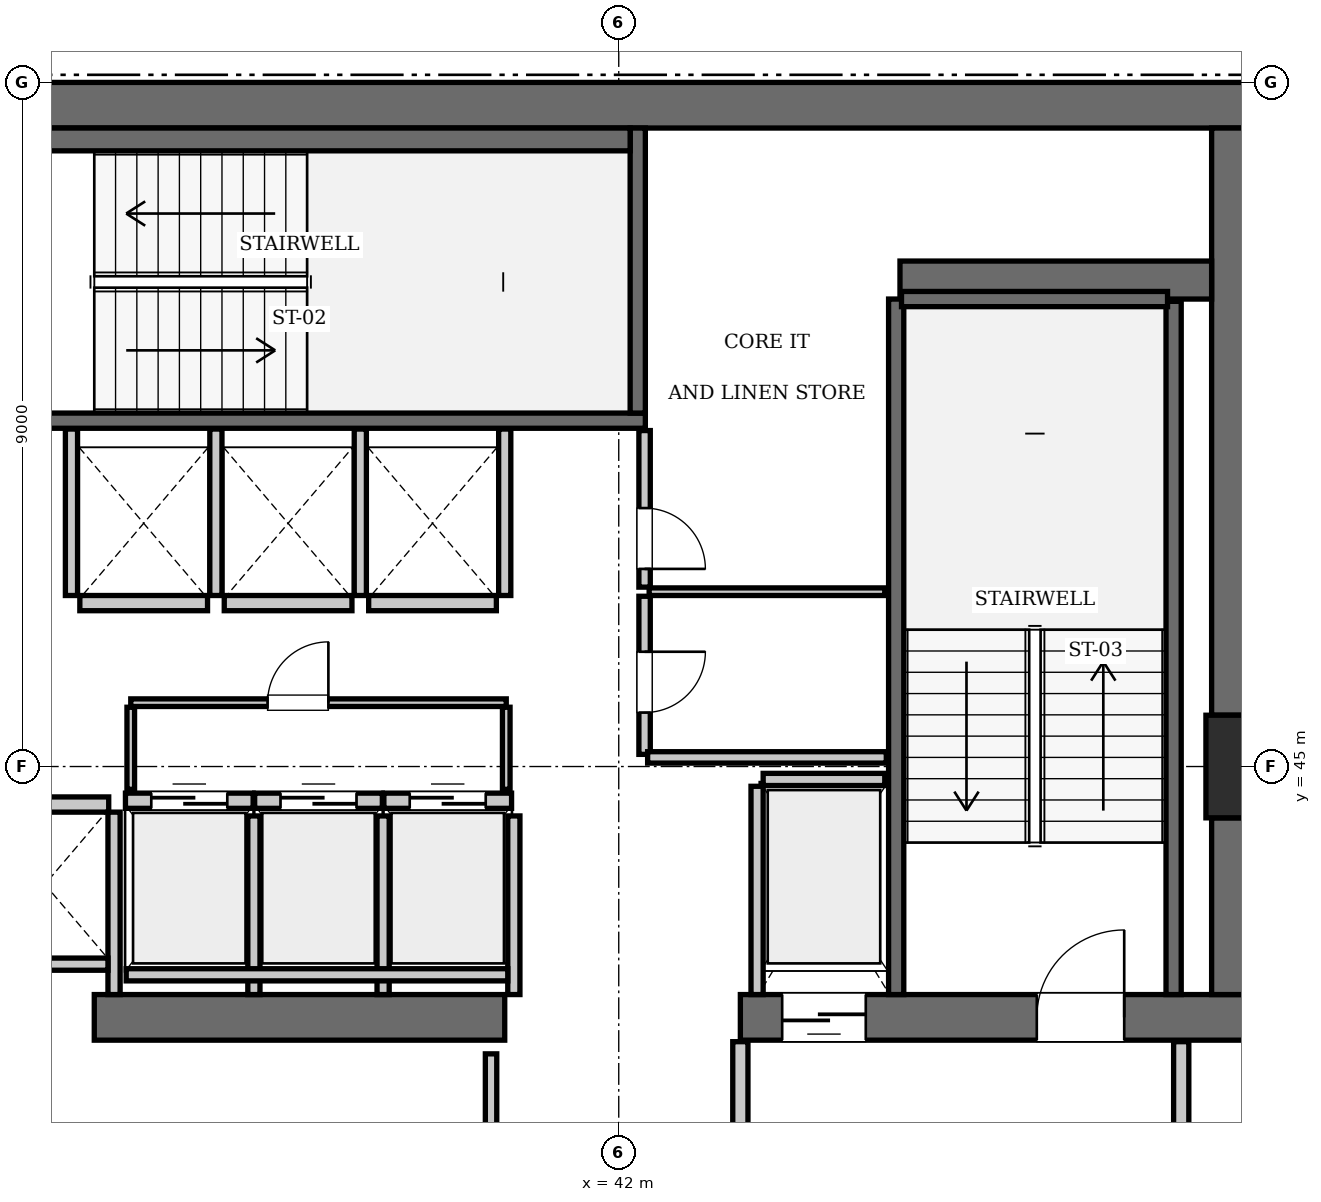
"""IFC4 building model, lengths in metres.
Left out: names, types, materials, properties, quantities, classifications, styles, units other than length and angle.
Written with IfcOpenShell. Run it as: python <this file> out.ifc"""

import sys

from ifc_helpers import new_model, si_unit, direction, frame, frame_2d, origin, origin_2d, place, context, subcontext, project, spatial, rectangle, extrude, element, fill, save


model = new_model("IFC4")
c1 = context("Model", 3, precision=1e-05, world=origin(), true_north=direction((0.0, 1.0)))
c2 = subcontext(c1, "Body", "Model", "MODEL_VIEW")
j1 = project(units=[si_unit("LENGTHUNIT", "METRE"), si_unit("PLANEANGLEUNIT", "RADIAN")], contexts=[c1])
p1 = place(None, origin())
s1 = spatial("IfcSite", under=j1, at=p1, CompositionType="ELEMENT")
p2 = place(p1, origin())
s2 = spatial("IfcBuilding", under=s1, at=p2, CompositionType="ELEMENT")
p3 = place(p2, frame((0.0, 0.0, 341.25)))
s3 = spatial("IfcBuildingStorey", under=s2, at=p3, CompositionType="ELEMENT", Elevation=341.25)
p4 = place(p3, frame((50.4, 45.0, 0.0), z_axis=(0.0, 0.0, 1.0), x_axis=(1.0, 0.0, 0.0)))
e1 = element("IfcColumn", 1, at=p4, inside=s3, PredefinedType="COLUMN", context=c2, shape_type="SweptSolid", body=[
    extrude(rectangle(XDim=1.35, YDim=1.35, at=origin_2d()), origin(), (0.0, 0.0, 1.0), 3.85),
])
p5 = place(p3, frame((25.2, 53.7, 0.0), z_axis=(0.0, 0.0, 1.0), x_axis=(1.0, 0.0, 0.0)))
e2 = element("IfcWall", 2, at=p5, inside=s3, PredefinedType="SHEAR", context=c2, shape_type="SweptSolid", body=[
    extrude(rectangle(XDim=25.2, YDim=0.6, at=frame_2d((12.6, 0.0))), origin(), (0.0, 0.0, 1.0), 3.85),
])
p6 = place(p3, frame((35.1, 41.7, 0.0), z_axis=(0.0, 0.0, 1.0), x_axis=(1.0, 0.0, 0.0)))
e3 = element("IfcWall", 3, at=p6, inside=s3, PredefinedType="SHEAR", context=c2, shape_type="SweptSolid", body=[
    extrude(rectangle(XDim=5.4, YDim=0.6, at=frame_2d((2.7, 0.0))), origin(), (0.0, 0.0, 1.0), 3.85),
])
p7 = place(p3, frame((43.6, 41.7, 0.0), z_axis=(0.0, 0.0, 1.0), x_axis=(1.0, 0.0, 0.0)))
e4 = element("IfcWall", 4, at=p7, inside=s3, PredefinedType="SHEAR", context=c2, shape_type="SweptSolid", body=[
    extrude(rectangle(XDim=6.8, YDim=0.6, at=frame_2d((3.4, 0.0))), origin(), (0.0, 0.0, 1.0), 3.85),
])
p8 = place(p7, frame((3.9, 0.0, 0.0)))
e5 = element("IfcOpeningElement", 5, at=p8, cuts=e4, PredefinedType="OPENING", context=c2, shape_type="SweptSolid", body=[
    extrude(rectangle(XDim=1.15, YDim=2.15, at=frame_2d((0.575, 1.075))), frame((0.0, 0.31, 0.0), z_axis=(0.0, -1.0, 0.0), x_axis=(1.0, 0.0, 0.0)), (0.0, 0.0, 1.0), 0.62),
])
p9 = place(p7, frame((0.55, 0.0, 0.0)))
e6 = element("IfcOpeningElement", 6, at=p9, cuts=e4, PredefinedType="OPENING", context=c2, shape_type="SweptSolid", body=[
    extrude(rectangle(XDim=1.1, YDim=2.2, at=frame_2d((0.55, 1.1))), frame((0.0, 0.31, 0.0), z_axis=(0.0, -1.0, 0.0), x_axis=(1.0, 0.0, 0.0)), (0.0, 0.0, 1.0), 0.62),
])
p10 = place(p3, frame((50.1, 42.0, 0.0), z_axis=(0.0, 0.0, 1.0), x_axis=(0.0, 1.0, 0.0)))
e7 = element("IfcWall", 7, at=p10, inside=s3, PredefinedType="SHEAR", context=c2, shape_type="SweptSolid", body=[
    extrude(rectangle(XDim=2.325, YDim=0.6, at=frame_2d((1.163, 0.0))), origin(), (0.0, 0.0, 1.0), 3.85),
])
p11 = place(p3, frame((50.1, 45.675, 0.0), z_axis=(0.0, 0.0, 1.0), x_axis=(0.0, 1.0, 0.0)))
e8 = element("IfcWall", 8, at=p11, inside=s3, PredefinedType="SHEAR", context=c2, shape_type="SweptSolid", body=[
    extrude(rectangle(XDim=7.725, YDim=0.6, at=frame_2d((3.862, 0.0))), origin(), (0.0, 0.0, 1.0), 3.85),
])
p12 = place(p3, frame((45.7, 51.4, 0.0), z_axis=(0.0, 0.0, 1.0), x_axis=(1.0, 0.0, 0.0)))
e9 = element("IfcWall", 9, at=p12, inside=s3, PredefinedType="SHEAR", context=c2, shape_type="SweptSolid", body=[
    extrude(rectangle(XDim=4.1, YDim=0.5, at=frame_2d((2.05, 0.0))), origin(), (0.0, 0.0, 1.0), 3.85),
])
p13 = place(p3, frame((33.25, 49.55, 0.0), z_axis=(0.0, 0.0, 1.0), x_axis=(1.0, 0.0, 0.0)))
e10 = element("IfcWall", 10, at=p13, inside=s3, PredefinedType="SOLIDWALL", context=c2, shape_type="SweptSolid", body=[
    extrude(rectangle(XDim=9.1, YDim=0.2, at=frame_2d((4.55, 0.0))), origin(), (0.0, 0.0, 1.0), 3.61),
])
p14 = place(p3, frame((42.25, 49.65, 0.0), z_axis=(0.0, 0.0, 1.0), x_axis=(0.0, 1.0, 0.0)))
e11 = element("IfcWall", 11, at=p14, inside=s3, PredefinedType="SOLIDWALL", context=c2, shape_type="SweptSolid", body=[
    extrude(rectangle(XDim=3.75, YDim=0.2, at=frame_2d((1.875, 0.0))), origin(), (0.0, 0.0, 1.0), 3.61),
])
p15 = place(p3, frame((33.45, 53.25, 0.0), z_axis=(0.0, 0.0, 1.0), x_axis=(1.0, 0.0, 0.0)))
e12 = element("IfcWall", 12, at=p15, inside=s3, PredefinedType="SOLIDWALL", context=c2, shape_type="SweptSolid", body=[
    extrude(rectangle(XDim=8.7, YDim=0.3, at=frame_2d((4.35, 0.0))), origin(), (0.0, 0.0, 1.0), 3.61),
])
p16 = place(p3, frame((45.65, 42.0, 0.0), z_axis=(0.0, 0.0, 1.0), x_axis=(0.0, 1.0, 0.0)))
e13 = element("IfcWall", 13, at=p16, inside=s3, PredefinedType="SOLIDWALL", context=c2, shape_type="SweptSolid", body=[
    extrude(rectangle(XDim=9.15, YDim=0.2, at=frame_2d((4.575, 0.0))), origin(), (0.0, 0.0, 1.0), 3.61),
])
p17 = place(p3, frame((49.3, 42.0, 0.0), z_axis=(0.0, 0.0, 1.0), x_axis=(0.0, 1.0, 0.0)))
e14 = element("IfcWall", 14, at=p17, inside=s3, PredefinedType="SOLIDWALL", context=c2, shape_type="SweptSolid", body=[
    extrude(rectangle(XDim=9.12, YDim=0.2, at=frame_2d((4.56, 0.0))), origin(), (0.0, 0.0, 1.0), 3.61),
])
p18 = place(p3, frame((45.72, 51.15, 0.0), z_axis=(0.0, 0.0, 1.0), x_axis=(1.0, 0.0, 0.0)))
e15 = element("IfcWall", 15, at=p18, inside=s3, PredefinedType="SOLIDWALL", context=c2, shape_type="SweptSolid", body=[
    extrude(rectangle(XDim=3.5, YDim=0.2, at=frame_2d((1.75, 0.0))), origin(), (0.0, 0.0, 1.0), 3.61),
])
p19 = place(p3, frame((35.51, 44.55, 0.0), z_axis=(0.0, 0.0, 1.0), x_axis=(1.0, 0.0, 0.0)))
e16 = element("IfcWall", 16, at=p19, inside=s3, PredefinedType="SOLIDWALL", context=c2, shape_type="SweptSolid", body=[
    extrude(rectangle(XDim=1.68, YDim=0.2, at=frame_2d((0.84, 0.0))), origin(), (0.0, 0.0, 1.0), 3.61),
])
p20 = place(p19, frame((0.34, 0.0, 0.0)))
e17 = element("IfcOpeningElement", 17, at=p20, cuts=e16, PredefinedType="OPENING", context=c2, shape_type="SweptSolid", body=[
    extrude(rectangle(XDim=1.0, YDim=2.15, at=frame_2d((0.5, 1.075))), frame((0.0, 0.11, 0.0), z_axis=(0.0, -1.0, 0.0), x_axis=(1.0, 0.0, 0.0)), (0.0, 0.0, 1.0), 0.22),
])
p21 = place(p3, frame((37.21, 44.55, 0.0), z_axis=(0.0, 0.0, 1.0), x_axis=(1.0, 0.0, 0.0)))
e18 = element("IfcWall", 18, at=p21, inside=s3, PredefinedType="SOLIDWALL", context=c2, shape_type="SweptSolid", body=[
    extrude(rectangle(XDim=1.68, YDim=0.2, at=frame_2d((0.84, 0.0))), origin(), (0.0, 0.0, 1.0), 3.61),
])
p22 = place(p21, frame((0.34, 0.0, 0.0)))
e19 = element("IfcOpeningElement", 19, at=p22, cuts=e18, PredefinedType="OPENING", context=c2, shape_type="SweptSolid", body=[
    extrude(rectangle(XDim=1.0, YDim=2.15, at=frame_2d((0.5, 1.075))), frame((0.0, 0.11, 0.0), z_axis=(0.0, -1.0, 0.0), x_axis=(1.0, 0.0, 0.0)), (0.0, 0.0, 1.0), 0.22),
])
p23 = place(p3, frame((38.91, 44.55, 0.0), z_axis=(0.0, 0.0, 1.0), x_axis=(1.0, 0.0, 0.0)))
e20 = element("IfcWall", 20, at=p23, inside=s3, PredefinedType="SOLIDWALL", context=c2, shape_type="SweptSolid", body=[
    extrude(rectangle(XDim=1.68, YDim=0.2, at=frame_2d((0.84, 0.0))), origin(), (0.0, 0.0, 1.0), 3.61),
])
p24 = place(p23, frame((0.34, 0.0, 0.0)))
e21 = element("IfcOpeningElement", 21, at=p24, cuts=e20, PredefinedType="OPENING", context=c2, shape_type="SweptSolid", body=[
    extrude(rectangle(XDim=1.0, YDim=2.15, at=frame_2d((0.5, 1.075))), frame((0.0, 0.11, 0.0), z_axis=(0.0, -1.0, 0.0), x_axis=(1.0, 0.0, 0.0)), (0.0, 0.0, 1.0), 0.22),
])
p25 = place(p3, frame((34.91, 47.15, 0.0), z_axis=(0.0, 0.0, 1.0), x_axis=(1.0, 0.0, 0.0)))
e22 = element("IfcWall", 22, at=p25, inside=s3, PredefinedType="SOLIDWALL", context=c2, shape_type="SweptSolid", body=[
    extrude(rectangle(XDim=1.68, YDim=0.2, at=frame_2d((0.84, 0.0))), origin(), (0.0, 0.0, 1.0), 3.61),
])
for number, where, z_axis, x_axis in (
    (23, (36.81, 47.15, 0.0), (0.0, 0.0, 1.0), (1.0, 0.0, 0.0)),
    (24, (38.71, 47.15, 0.0), (0.0, 0.0, 1.0), (1.0, 0.0, 0.0)),
    (25, (33.61, 44.5, 0.0), (0.0, 0.0, 1.0), (1.0, 0.0, 0.0)),
):
    element("IfcWall", number, at=place(p3, frame(where, z_axis=z_axis, x_axis=x_axis)), inside=s3, PredefinedType="SOLIDWALL", context=c2, shape_type="SweptSolid", body=[
        extrude(rectangle(XDim=1.68, YDim=0.2, at=frame_2d((0.84, 0.0))), origin(), (0.0, 0.0, 1.0), 3.61),
    ])
p26 = place(p3, frame((43.9, 44.83, 0.0), z_axis=(0.0, 0.0, 1.0), x_axis=(1.0, 0.0, 0.0)))
e26 = element("IfcWall", 26, at=p26, inside=s3, PredefinedType="SOLIDWALL", context=c2, shape_type="SweptSolid", body=[
    extrude(rectangle(XDim=1.6, YDim=0.16, at=frame_2d((0.8, 0.0))), origin(), (0.0, 0.0, 1.0), 3.61),
])
p27 = place(p3, frame((43.82, 42.0, 0.0), z_axis=(0.0, 0.0, 1.0), x_axis=(0.0, 1.0, 0.0)))
e27 = element("IfcWall", 27, at=p27, inside=s3, PredefinedType="SOLIDWALL", context=c2, shape_type="SweptSolid", body=[
    extrude(rectangle(XDim=2.74, YDim=0.16, at=frame_2d((1.37, 0.0))), origin(), (0.0, 0.0, 1.0), 3.61),
])
for number, where, z_axis, x_axis in (
    (28, (37.2, 42.0, 0.0), (0.0, 0.0, 1.0), (0.0, 1.0, 0.0)),
    (29, (38.9, 42.0, 0.0), (0.0, 0.0, 1.0), (0.0, 1.0, 0.0)),
    (30, (40.62, 42.0, 0.0), (0.0, 0.0, 1.0), (0.0, 1.0, 0.0)),
):
    element("IfcWall", number, at=place(p3, frame(where, z_axis=z_axis, x_axis=x_axis)), inside=s3, PredefinedType="SOLIDWALL", context=c2, shape_type="SweptSolid", body=[
        extrude(rectangle(XDim=2.35, YDim=0.16, at=frame_2d((1.175, 0.0))), origin(), (0.0, 0.0, 1.0), 3.61),
    ])
p28 = place(p3, frame((35.52, 42.26, 0.0), z_axis=(0.0, 0.0, 1.0), x_axis=(1.0, 0.0, 0.0)))
e31 = element("IfcWall", 31, at=p28, inside=s3, PredefinedType="SOLIDWALL", context=c2, shape_type="SweptSolid", body=[
    extrude(rectangle(XDim=5.02, YDim=0.16, at=frame_2d((2.51, 0.0))), origin(), (0.0, 0.0, 1.0), 3.61),
])
for number, where, z_axis, x_axis in (
    (32, (34.8, 47.25, 0.0), (0.0, 0.0, 1.0), (0.0, 1.0, 0.0)),
    (33, (36.7, 47.25, 0.0), (0.0, 0.0, 1.0), (0.0, 1.0, 0.0)),
    (34, (38.6, 47.25, 0.0), (0.0, 0.0, 1.0), (0.0, 1.0, 0.0)),
    (35, (40.5, 47.25, 0.0), (0.0, 0.0, 1.0), (0.0, 1.0, 0.0)),
):
    element("IfcWall", number, at=place(p3, frame(where, z_axis=z_axis, x_axis=x_axis)), inside=s3, PredefinedType="SOLIDWALL", context=c2, shape_type="SweptSolid", body=[
        extrude(rectangle(XDim=2.19, YDim=0.16, at=frame_2d((1.095, 0.0))), origin(), (0.0, 0.0, 1.0), 3.61),
    ])
p29 = place(p3, frame((35.36, 42.0, 0.0), z_axis=(0.0, 0.0, 1.0), x_axis=(0.0, 1.0, 0.0)))
e36 = element("IfcWall", 36, at=p29, inside=s3, PredefinedType="SOLIDWALL", context=c2, shape_type="SweptSolid", body=[
    extrude(rectangle(XDim=2.4, YDim=0.16, at=frame_2d((1.2, 0.0))), origin(), (0.0, 0.0, 1.0), 3.61),
])
p30 = place(p3, frame((33.62, 42.4, 0.0), z_axis=(0.0, 0.0, 1.0), x_axis=(1.0, 0.0, 0.0)))
e37 = element("IfcWall", 37, at=p30, inside=s3, PredefinedType="SOLIDWALL", context=c2, shape_type="SweptSolid", body=[
    extrude(rectangle(XDim=1.66, YDim=0.16, at=frame_2d((0.83, 0.0))), origin(), (0.0, 0.0, 1.0), 3.61),
])
for number, where, z_axis, x_axis in (
    (38, (43.6, 38.31, 0.0), (0.0, 0.0, 1.0), (0.0, 1.0, 0.0)),
    (39, (49.4, 38.31, 0.0), (0.0, 0.0, 1.0), (0.0, 1.0, 0.0)),
):
    element("IfcWall", number, at=place(p3, frame(where, z_axis=z_axis, x_axis=x_axis)), inside=s3, PredefinedType="PARTITIONING", context=c2, shape_type="SweptSolid", body=[
        extrude(rectangle(XDim=3.07, YDim=0.2, at=frame_2d((1.535, 0.0))), origin(), (0.0, 0.0, 1.0), 3.61),
    ])
p31 = place(p3, frame((35.58, 45.84, 0.0), z_axis=(0.0, 0.0, 1.0), x_axis=(1.0, 0.0, 0.0)))
e40 = element("IfcWall", 40, at=p31, inside=s3, PredefinedType="PARTITIONING", context=c2, shape_type="SweptSolid", body=[
    extrude(rectangle(XDim=4.94, YDim=0.1, at=frame_2d((2.47, 0.0))), origin(), (0.0, 0.0, 1.0), 3.61),
])
p32 = place(p31, frame((1.8, 0.0, 0.0)))
e41 = element("IfcOpeningElement", 41, at=p32, cuts=e40, PredefinedType="OPENING", context=c2, shape_type="SweptSolid", body=[
    extrude(rectangle(XDim=0.8, YDim=2.05, at=frame_2d((0.4, 1.025))), frame((0.0, 0.06, 0.0), z_axis=(0.0, -1.0, 0.0), x_axis=(1.0, 0.0, 0.0)), (0.0, 0.0, 1.0), 0.12),
])
for number, where, z_axis, x_axis in (
    (42, (35.58, 44.7, 0.0), (0.0, 0.0, 1.0), (0.0, 1.0, 0.0)),
    (43, (40.52, 44.7, 0.0), (0.0, 0.0, 1.0), (0.0, 1.0, 0.0)),
):
    element("IfcWall", number, at=place(p3, frame(where, z_axis=z_axis, x_axis=x_axis)), inside=s3, PredefinedType="PARTITIONING", context=c2, shape_type="SweptSolid", body=[
        extrude(rectangle(XDim=1.08, YDim=0.1, at=frame_2d((0.54, 0.0))), origin(), (0.0, 0.0, 1.0), 3.61),
    ])
p33 = place(p3, frame((42.34, 45.16, 0.0), z_axis=(0.0, 0.0, 1.0), x_axis=(0.0, 1.0, 0.0)))
e44 = element("IfcWall", 44, at=p33, inside=s3, PredefinedType="PARTITIONING", context=c2, shape_type="SweptSolid", body=[
    extrude(rectangle(XDim=2.08, YDim=0.15, at=frame_2d((1.04, 0.0))), origin(), (0.0, 0.0, 1.0), 3.61),
])
p34 = place(p33, frame((0.55, 0.0, 0.0)))
e45 = element("IfcOpeningElement", 45, at=p34, cuts=e44, PredefinedType="OPENING", context=c2, shape_type="SweptSolid", body=[
    extrude(rectangle(XDim=0.8, YDim=2.05, at=frame_2d((0.4, 1.025))), frame((0.0, 0.085, 0.0), z_axis=(0.0, -1.0, 0.0), x_axis=(1.0, 0.0, 0.0)), (0.0, 0.0, 1.0), 0.17),
])
p35 = place(p3, frame((42.34, 47.36, 0.0), z_axis=(0.0, 0.0, 1.0), x_axis=(0.0, 1.0, 0.0)))
e46 = element("IfcWall", 46, at=p35, inside=s3, PredefinedType="PARTITIONING", context=c2, shape_type="SweptSolid", body=[
    extrude(rectangle(XDim=2.06, YDim=0.15, at=frame_2d((1.03, 0.0))), origin(), (0.0, 0.0, 1.0), 3.61),
])
p36 = place(p35, frame((0.24, 0.0, 0.0)))
e47 = element("IfcOpeningElement", 47, at=p36, cuts=e46, PredefinedType="OPENING", context=c2, shape_type="SweptSolid", body=[
    extrude(rectangle(XDim=0.8, YDim=2.05, at=frame_2d((0.4, 1.025))), frame((0.0, 0.085, 0.0), z_axis=(0.0, -1.0, 0.0), x_axis=(1.0, 0.0, 0.0)), (0.0, 0.0, 1.0), 0.17),
])
p37 = place(p3, frame((42.4, 47.3, 0.0), z_axis=(0.0, 0.0, 1.0), x_axis=(1.0, 0.0, 0.0)))
e48 = element("IfcWall", 48, at=p37, inside=s3, PredefinedType="PARTITIONING", context=c2, shape_type="SweptSolid", body=[
    extrude(rectangle(XDim=3.1, YDim=0.1, at=frame_2d((1.55, 0.0))), origin(), (0.0, 0.0, 1.0), 3.61),
])
p38 = place(p3, frame((42.38, 45.12, 0.0), z_axis=(0.0, 0.0, 1.0), x_axis=(1.0, 0.0, 0.0)))
e49 = element("IfcWall", 49, at=p38, inside=s3, PredefinedType="PARTITIONING", context=c2, shape_type="SweptSolid", body=[
    extrude(rectangle(XDim=3.14, YDim=0.15, at=frame_2d((1.57, 0.0))), origin(), (0.0, 0.0, 1.0), 3.61),
])
p39 = place(p3, frame((40.32, 38.38, 0.0), z_axis=(0.0, 0.0, 1.0), x_axis=(0.0, 1.0, 0.0)))
e50 = element("IfcWall", 50, at=p39, inside=s3, PredefinedType="PARTITIONING", context=c2, shape_type="SweptSolid", body=[
    extrude(rectangle(XDim=2.84, YDim=0.15, at=frame_2d((1.42, 0.0))), origin(), (0.0, 0.0, 1.0), 3.61),
])
p40 = place(p8, origin())
e51 = element("IfcDoor", 51, at=p40, inside=s3, OperationType="SINGLE_SWING_RIGHT", PredefinedType="DOOR", context=c2, shape_type="SweptSolid", body=[
    extrude(rectangle(XDim=1.15, YDim=2.15, at=frame_2d((0.575, 1.075))), frame((0.0, 0.025, 0.0), z_axis=(0.0, -1.0, 0.0), x_axis=(1.0, 0.0, 0.0)), (0.0, 0.0, 1.0), 0.05),
])
fill(e5, e51)
p41 = place(p20, origin())
e52 = element("IfcDoor", 52, at=p41, inside=s3, OperationType="SLIDING_TO_LEFT", PredefinedType="DOOR", context=c2, shape_type="SweptSolid", body=[
    extrude(rectangle(XDim=1.0, YDim=2.15, at=frame_2d((0.5, 1.075))), frame((0.0, 0.025, 0.0), z_axis=(0.0, -1.0, 0.0), x_axis=(1.0, 0.0, 0.0)), (0.0, 0.0, 1.0), 0.05),
])
fill(e17, e52)
p42 = place(p22, origin())
e53 = element("IfcDoor", 53, at=p42, inside=s3, OperationType="SLIDING_TO_LEFT", PredefinedType="DOOR", context=c2, shape_type="SweptSolid", body=[
    extrude(rectangle(XDim=1.0, YDim=2.15, at=frame_2d((0.5, 1.075))), frame((0.0, 0.025, 0.0), z_axis=(0.0, -1.0, 0.0), x_axis=(1.0, 0.0, 0.0)), (0.0, 0.0, 1.0), 0.05),
])
fill(e19, e53)
p43 = place(p24, origin())
e54 = element("IfcDoor", 54, at=p43, inside=s3, OperationType="SLIDING_TO_LEFT", PredefinedType="DOOR", context=c2, shape_type="SweptSolid", body=[
    extrude(rectangle(XDim=1.0, YDim=2.15, at=frame_2d((0.5, 1.075))), frame((0.0, 0.025, 0.0), z_axis=(0.0, -1.0, 0.0), x_axis=(1.0, 0.0, 0.0)), (0.0, 0.0, 1.0), 0.05),
])
fill(e21, e54)
p44 = place(p9, frame((1.1, 0.0, 0.0), z_axis=(0.0, 0.0, 1.0), x_axis=(-1.0, 0.0, 0.0)))
e55 = element("IfcDoor", 55, at=p44, inside=s3, OperationType="SLIDING_TO_LEFT", PredefinedType="DOOR", context=c2, shape_type="SweptSolid", body=[
    extrude(rectangle(XDim=1.1, YDim=2.2, at=frame_2d((0.55, 1.1))), frame((0.0, 0.025, 0.0), z_axis=(0.0, -1.0, 0.0), x_axis=(1.0, 0.0, 0.0)), (0.0, 0.0, 1.0), 0.05),
])
fill(e6, e55)
p45 = place(p32, origin())
e56 = element("IfcDoor", 56, at=p45, inside=s3, OperationType="SINGLE_SWING_RIGHT", PredefinedType="DOOR", context=c2, shape_type="SweptSolid", body=[
    extrude(rectangle(XDim=0.8, YDim=2.05, at=frame_2d((0.4, 1.025))), frame((0.0, 0.025, 0.0), z_axis=(0.0, -1.0, 0.0), x_axis=(1.0, 0.0, 0.0)), (0.0, 0.0, 1.0), 0.05),
])
fill(e41, e56)
p46 = place(p34, frame((0.8, 0.0, 0.0), z_axis=(0.0, 0.0, 1.0), x_axis=(-1.0, 0.0, 0.0)))
e57 = element("IfcDoor", 57, at=p46, inside=s3, OperationType="SINGLE_SWING_LEFT", PredefinedType="DOOR", context=c2, shape_type="SweptSolid", body=[
    extrude(rectangle(XDim=0.8, YDim=2.05, at=frame_2d((0.4, 1.025))), frame((0.0, 0.025, 0.0), z_axis=(0.0, -1.0, 0.0), x_axis=(1.0, 0.0, 0.0)), (0.0, 0.0, 1.0), 0.05),
])
fill(e45, e57)
p47 = place(p36, frame((0.8, 0.0, 0.0), z_axis=(0.0, 0.0, 1.0), x_axis=(-1.0, 0.0, 0.0)))
e58 = element("IfcDoor", 58, at=p47, inside=s3, OperationType="SINGLE_SWING_RIGHT", PredefinedType="DOOR", context=c2, shape_type="SweptSolid", body=[
    extrude(rectangle(XDim=0.8, YDim=2.05, at=frame_2d((0.4, 1.025))), frame((0.0, 0.025, 0.0), z_axis=(0.0, -1.0, 0.0), x_axis=(1.0, 0.0, 0.0)), (0.0, 0.0, 1.0), 0.05),
])
fill(e47, e58)
save(model, sys.argv[1])
